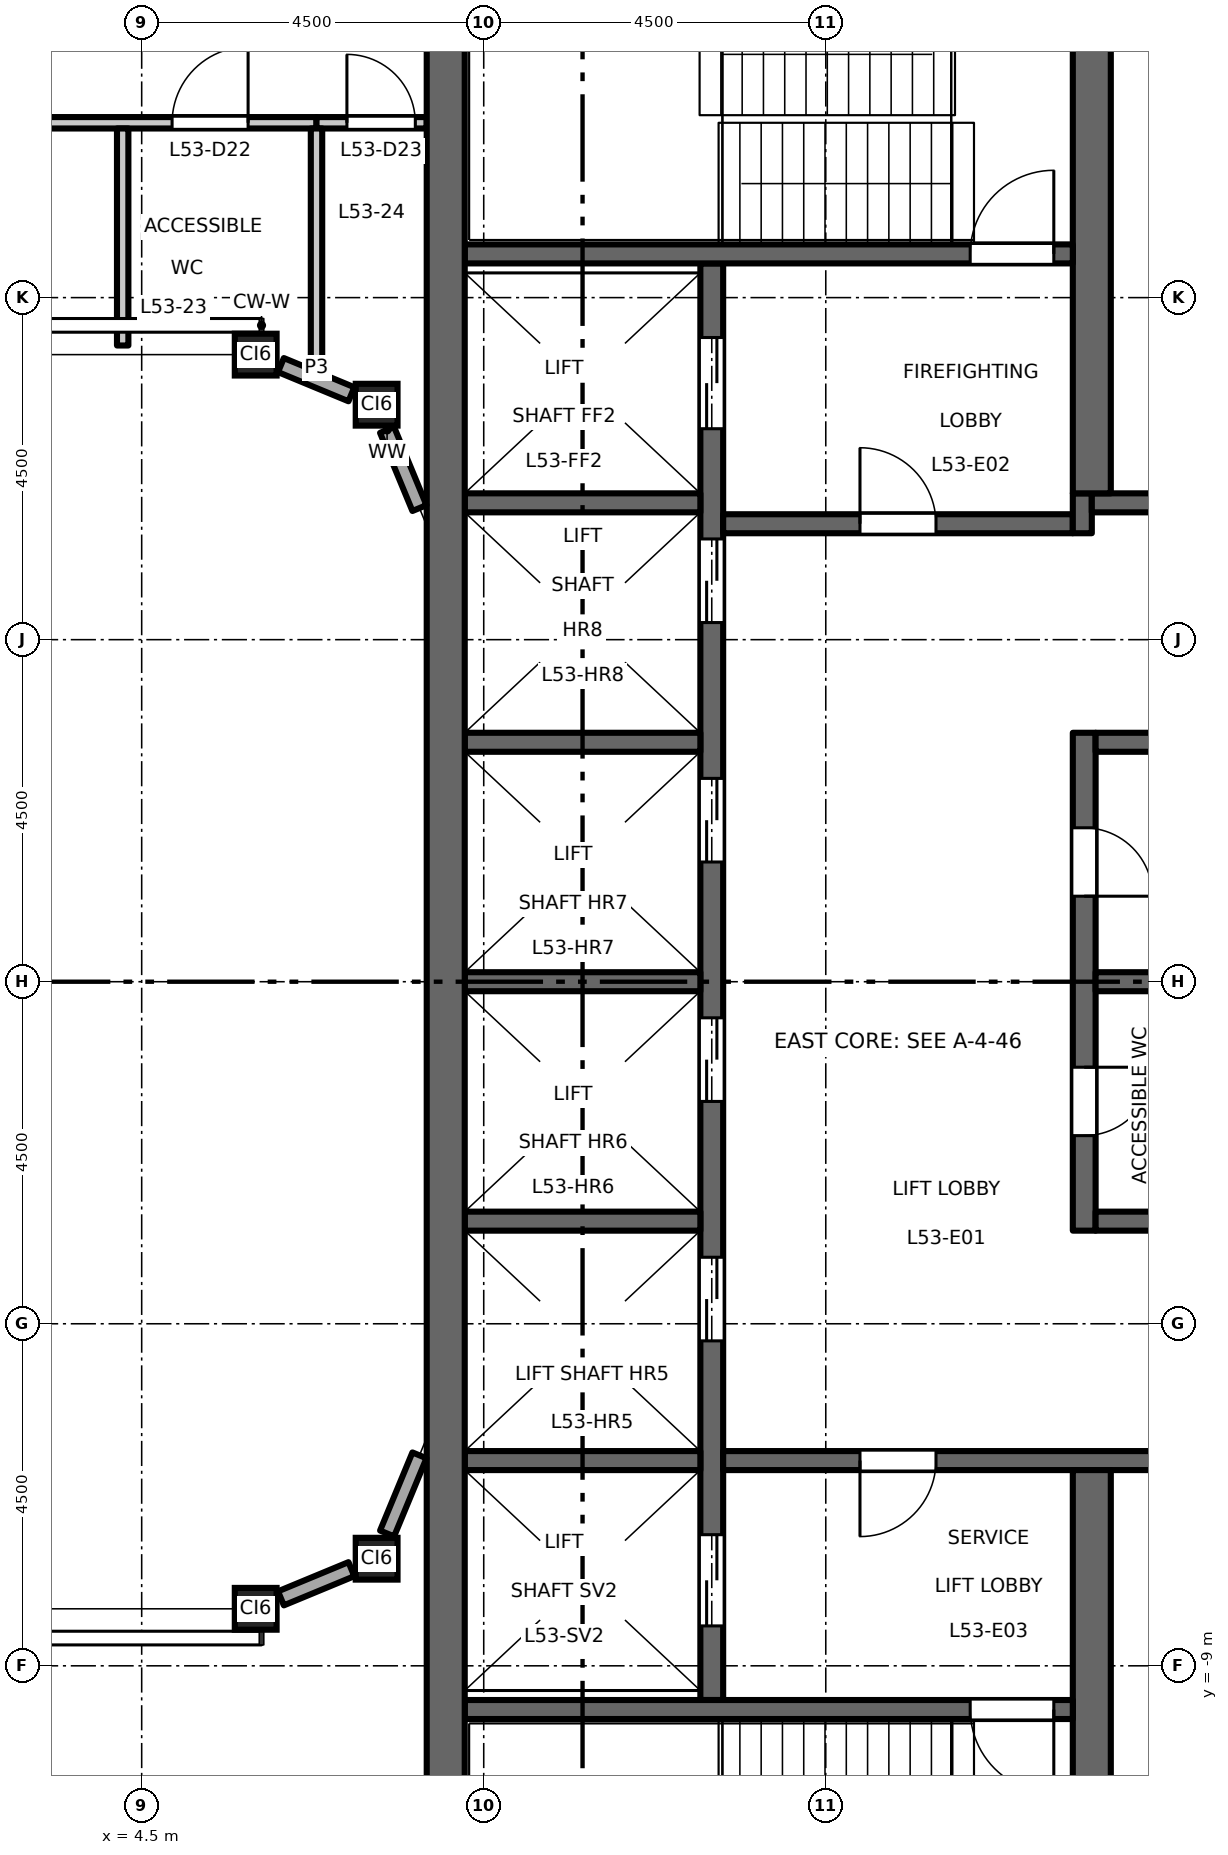
"""IFC4 building model, lengths in metres.
Left out: names, types, materials, properties, quantities, classifications, styles, units other than length and angle.
Written with IfcOpenShell. Run it as: python <this file> out.ifc"""

import sys

from ifc_helpers import new_model, si_unit, direction, frame, frame_2d, origin, origin_2d, place, context, subcontext, project, spatial, rectangle, hollow_rectangle, extrude, element, fill, save


model = new_model("IFC4")
c1 = context("Model", 3, precision=1e-05, world=origin(), true_north=direction((0.0, 1.0)))
c2 = subcontext(c1, "Body", "Model", "MODEL_VIEW")
j1 = project(units=[si_unit("LENGTHUNIT", "METRE"), si_unit("PLANEANGLEUNIT", "RADIAN")], contexts=[c1])
p1 = place(None, origin())
s1 = spatial("IfcSite", under=j1, at=p1, CompositionType="ELEMENT")
p2 = place(p1, origin())
s2 = spatial("IfcBuilding", under=s1, at=p2, CompositionType="ELEMENT")
p3 = place(p2, frame((0.0, 0.0, 246.7)))
s3 = spatial("IfcBuildingStorey", under=s2, at=p3, CompositionType="ELEMENT", Elevation=246.7)
for number, where, z_axis, x_axis in (
    (1, (6.0, -8.25, 0.0), (0.0, 0.0, 1.0), (1.0, 0.0, 0.0)),
    (2, (7.591, -7.591, 0.0), (0.0, 0.0, 1.0), (1.0, 0.0, 0.0)),
    (3, (6.0, 8.25, 0.0), (0.0, 0.0, 1.0), (1.0, 0.0, 0.0)),
    (4, (7.591, 7.591, 0.0), (0.0, 0.0, 1.0), (1.0, 0.0, 0.0)),
):
    element("IfcColumn", number, at=place(p3, frame(where, z_axis=z_axis, x_axis=x_axis)), inside=s3, PredefinedType="COLUMN", context=c2, shape_type="SweptSolid", body=[
        extrude(hollow_rectangle(XDim=0.55, YDim=0.55, WallThickness=0.028, at=origin_2d()), origin(), (0.0, 0.0, 1.0), 4.5),
    ])
p4 = place(p3, frame((12.0, -9.45, 0.0), z_axis=(0.0, 0.0, 1.0), x_axis=(0.0, 1.0, 0.0)))
e5 = element("IfcWall", 5, at=p4, inside=s3, PredefinedType="SHEAR", context=c2, shape_type="SweptSolid", body=[
    extrude(rectangle(XDim=18.9, YDim=0.3, at=frame_2d((9.45, 0.0))), origin(), (0.0, 0.0, 1.0), 4.35),
])
p5 = place(p4, frame((4.725, 0.0, 0.0)))
e6 = element("IfcOpeningElement", 6, at=p5, cuts=e5, PredefinedType="OPENING", context=c2, shape_type="SweptSolid", body=[
    extrude(rectangle(XDim=1.1, YDim=2.1, at=frame_2d((0.55, 1.05))), frame((0.0, 0.16, 0.0), z_axis=(0.0, -1.0, 0.0), x_axis=(1.0, 0.0, 0.0)), (0.0, 0.0, 1.0), 0.32),
])
p6 = place(p4, frame((7.875, 0.0, 0.0)))
e7 = element("IfcOpeningElement", 7, at=p6, cuts=e5, PredefinedType="OPENING", context=c2, shape_type="SweptSolid", body=[
    extrude(rectangle(XDim=1.1, YDim=2.1, at=frame_2d((0.55, 1.05))), frame((0.0, 0.16, 0.0), z_axis=(0.0, -1.0, 0.0), x_axis=(1.0, 0.0, 0.0)), (0.0, 0.0, 1.0), 0.32),
])
p7 = place(p4, frame((11.025, 0.0, 0.0)))
e8 = element("IfcOpeningElement", 8, at=p7, cuts=e5, PredefinedType="OPENING", context=c2, shape_type="SweptSolid", body=[
    extrude(rectangle(XDim=1.1, YDim=2.1, at=frame_2d((0.55, 1.05))), frame((0.0, 0.16, 0.0), z_axis=(0.0, -1.0, 0.0), x_axis=(1.0, 0.0, 0.0)), (0.0, 0.0, 1.0), 0.32),
])
p8 = place(p4, frame((14.175, 0.0, 0.0)))
e9 = element("IfcOpeningElement", 9, at=p8, cuts=e5, PredefinedType="OPENING", context=c2, shape_type="SweptSolid", body=[
    extrude(rectangle(XDim=1.1, YDim=2.1, at=frame_2d((0.55, 1.05))), frame((0.0, 0.16, 0.0), z_axis=(0.0, -1.0, 0.0), x_axis=(1.0, 0.0, 0.0)), (0.0, 0.0, 1.0), 0.32),
])
p9 = place(p4, frame((16.725, 0.0, 0.0)))
e10 = element("IfcOpeningElement", 10, at=p9, cuts=e5, PredefinedType="OPENING", context=c2, shape_type="SweptSolid", body=[
    extrude(rectangle(XDim=1.2, YDim=2.1, at=frame_2d((0.6, 1.05))), frame((0.0, 0.16, 0.0), z_axis=(0.0, -1.0, 0.0), x_axis=(1.0, 0.0, 0.0)), (0.0, 0.0, 1.0), 0.32),
])
p10 = place(p4, frame((0.975, 0.0, 0.0)))
e11 = element("IfcOpeningElement", 11, at=p10, cuts=e5, PredefinedType="OPENING", context=c2, shape_type="SweptSolid", body=[
    extrude(rectangle(XDim=1.2, YDim=2.1, at=frame_2d((0.6, 1.05))), frame((0.0, 0.16, 0.0), z_axis=(0.0, -1.0, 0.0), x_axis=(1.0, 0.0, 0.0)), (0.0, 0.0, 1.0), 0.32),
])
p11 = place(p3, frame((12.15, 6.025, 0.0), z_axis=(0.0, 0.0, 1.0), x_axis=(1.0, 0.0, 0.0)))
e12 = element("IfcWall", 12, at=p11, inside=s3, PredefinedType="SHEAR", context=c2, shape_type="SweptSolid", body=[
    extrude(rectangle(XDim=4.6, YDim=0.25, at=frame_2d((2.3, 0.0))), origin(), (0.0, 0.0, 1.0), 4.35),
])
p12 = place(p11, frame((1.8, 0.0, 0.0)))
e13 = element("IfcOpeningElement", 13, at=p12, cuts=e12, PredefinedType="OPENING", context=c2, shape_type="SweptSolid", body=[
    extrude(rectangle(XDim=1.0, YDim=2.1, at=frame_2d((0.5, 1.05))), frame((0.0, 0.135, 0.0), z_axis=(0.0, -1.0, 0.0), x_axis=(1.0, 0.0, 0.0)), (0.0, 0.0, 1.0), 0.27),
])
p13 = place(p3, frame((16.875, 5.9, 0.0), z_axis=(0.0, 0.0, 1.0), x_axis=(0.0, 1.0, 0.0)))
e14 = element("IfcWall", 14, at=p13, inside=s3, PredefinedType="SHEAR", context=c2, shape_type="SweptSolid", body=[
    extrude(rectangle(XDim=0.525, YDim=0.25, at=frame_2d((0.263, 0.0))), origin(), (0.0, 0.0, 1.0), 4.35),
])
p14 = place(p3, frame((17.0, 6.3, 0.0), z_axis=(0.0, 0.0, 1.0), x_axis=(1.0, 0.0, 0.0)))
e15 = element("IfcWall", 15, at=p14, inside=s3, PredefinedType="SHEAR", context=c2, shape_type="SweptSolid", body=[
    extrude(rectangle(XDim=4.25, YDim=0.25, at=frame_2d((2.125, 0.0))), origin(), (0.0, 0.0, 1.0), 4.35),
])
p15 = place(p3, frame((12.15, -6.3, 0.0), z_axis=(0.0, 0.0, 1.0), x_axis=(1.0, 0.0, 0.0)))
e16 = element("IfcWall", 16, at=p15, inside=s3, PredefinedType="SHEAR", context=c2, shape_type="SweptSolid", body=[
    extrude(rectangle(XDim=9.1, YDim=0.25, at=frame_2d((4.55, 0.0))), origin(), (0.0, 0.0, 1.0), 4.35),
])
p16 = place(p15, frame((1.8, 0.0, 0.0)))
e17 = element("IfcOpeningElement", 17, at=p16, cuts=e16, PredefinedType="OPENING", context=c2, shape_type="SweptSolid", body=[
    extrude(rectangle(XDim=1.0, YDim=2.1, at=frame_2d((0.5, 1.05))), frame((0.0, 0.135, 0.0), z_axis=(0.0, -1.0, 0.0), x_axis=(1.0, 0.0, 0.0)), (0.0, 0.0, 1.0), 0.27),
])
p17 = place(p3, frame((16.9, -3.275, 0.0), z_axis=(0.0, 0.0, 1.0), x_axis=(0.0, 1.0, 0.0)))
e18 = element("IfcWall", 18, at=p17, inside=s3, PredefinedType="SHEAR", context=c2, shape_type="SweptSolid", body=[
    extrude(rectangle(XDim=6.55, YDim=0.3, at=frame_2d((3.275, 0.0))), origin(), (0.0, 0.0, 1.0), 4.35),
])
p18 = place(p17, frame((1.25, 0.0, 0.0)))
e19 = element("IfcOpeningElement", 19, at=p18, cuts=e18, PredefinedType="OPENING", context=c2, shape_type="SweptSolid", body=[
    extrude(rectangle(XDim=0.9, YDim=2.1, at=frame_2d((0.45, 1.05))), frame((0.0, 0.16, 0.0), z_axis=(0.0, -1.0, 0.0), x_axis=(1.0, 0.0, 0.0)), (0.0, 0.0, 1.0), 0.32),
])
p19 = place(p17, frame((4.4, 0.0, 0.0)))
e20 = element("IfcOpeningElement", 20, at=p19, cuts=e18, PredefinedType="OPENING", context=c2, shape_type="SweptSolid", body=[
    extrude(rectangle(XDim=0.9, YDim=2.1, at=frame_2d((0.45, 1.05))), frame((0.0, 0.16, 0.0), z_axis=(0.0, -1.0, 0.0), x_axis=(1.0, 0.0, 0.0)), (0.0, 0.0, 1.0), 0.32),
])
for number, where, z_axis, x_axis in (
    (21, (17.05, 0.0, 0.0), (0.0, 0.0, 1.0), (1.0, 0.0, 0.0)),
    (22, (17.05, 3.15, 0.0), (0.0, 0.0, 1.0), (1.0, 0.0, 0.0)),
    (23, (17.05, -3.15, 0.0), (0.0, 0.0, 1.0), (1.0, 0.0, 0.0)),
):
    element("IfcWall", number, at=place(p3, frame(where, z_axis=z_axis, x_axis=x_axis)), inside=s3, PredefinedType="SHEAR", context=c2, shape_type="SweptSolid", body=[
        extrude(rectangle(XDim=4.2, YDim=0.25, at=frame_2d((2.1, 0.0))), origin(), (0.0, 0.0, 1.0), 4.35),
    ])
for number, where, z_axis, x_axis in (
    (24, (17.0, 6.425, 0.0), (0.0, 0.0, 1.0), (0.0, 1.0, 0.0)),
    (25, (17.0, -13.0, 0.0), (0.0, 0.0, 1.0), (0.0, 1.0, 0.0)),
):
    element("IfcWall", number, at=place(p3, frame(where, z_axis=z_axis, x_axis=x_axis)), inside=s3, PredefinedType="SHEAR", context=c2, shape_type="SweptSolid", body=[
        extrude(rectangle(XDim=6.575, YDim=0.5, at=frame_2d((3.288, 0.0))), origin(), (0.0, 0.0, 1.0), 4.35),
    ])
for number, where, z_axis, x_axis in (
    (26, (8.75, 0.0, 0.0), (0.0, 0.0, 1.0), (1.0, 0.0, 0.0)),
    (27, (8.75, 3.15, 0.0), (0.0, 0.0, 1.0), (1.0, 0.0, 0.0)),
    (28, (8.75, 6.3, 0.0), (0.0, 0.0, 1.0), (1.0, 0.0, 0.0)),
    (29, (8.75, -3.15, 0.0), (0.0, 0.0, 1.0), (1.0, 0.0, 0.0)),
    (30, (8.75, -6.3, 0.0), (0.0, 0.0, 1.0), (1.0, 0.0, 0.0)),
):
    element("IfcWall", number, at=place(p3, frame(where, z_axis=z_axis, x_axis=x_axis)), inside=s3, PredefinedType="SHEAR", context=c2, shape_type="SweptSolid", body=[
        extrude(rectangle(XDim=3.1, YDim=0.25, at=frame_2d((1.55, 0.0))), origin(), (0.0, 0.0, 1.0), 4.35),
    ])
p20 = place(p3, frame((8.75, 9.575, 0.0), z_axis=(0.0, 0.0, 1.0), x_axis=(1.0, 0.0, 0.0)))
e31 = element("IfcWall", 31, at=p20, inside=s3, PredefinedType="SHEAR", context=c2, shape_type="SweptSolid", body=[
    extrude(rectangle(XDim=8.0, YDim=0.25, at=frame_2d((4.0, 0.0))), origin(), (0.0, 0.0, 1.0), 4.35),
])
p21 = place(p20, frame((6.65, 0.0, 0.0)))
e32 = element("IfcOpeningElement", 32, at=p21, cuts=e31, PredefinedType="OPENING", context=c2, shape_type="SweptSolid", body=[
    extrude(rectangle(XDim=1.1, YDim=2.1, at=frame_2d((0.55, 1.05))), frame((0.0, 0.135, 0.0), z_axis=(0.0, -1.0, 0.0), x_axis=(1.0, 0.0, 0.0)), (0.0, 0.0, 1.0), 0.27),
])
p22 = place(p3, frame((8.75, -9.575, 0.0), z_axis=(0.0, 0.0, 1.0), x_axis=(1.0, 0.0, 0.0)))
e33 = element("IfcWall", 33, at=p22, inside=s3, PredefinedType="SHEAR", context=c2, shape_type="SweptSolid", body=[
    extrude(rectangle(XDim=8.0, YDim=0.25, at=frame_2d((4.0, 0.0))), origin(), (0.0, 0.0, 1.0), 4.35),
])
p23 = place(p22, frame((6.65, 0.0, 0.0)))
e34 = element("IfcOpeningElement", 34, at=p23, cuts=e33, PredefinedType="OPENING", context=c2, shape_type="SweptSolid", body=[
    extrude(rectangle(XDim=1.1, YDim=2.1, at=frame_2d((0.55, 1.05))), frame((0.0, 0.135, 0.0), z_axis=(0.0, -1.0, 0.0), x_axis=(1.0, 0.0, 0.0)), (0.0, 0.0, 1.0), 0.27),
])
p24 = place(p3, frame((8.5, -13.0, 0.0), z_axis=(0.0, 0.0, 1.0), x_axis=(0.0, 1.0, 0.0)))
e35 = element("IfcWall", 35, at=p24, inside=s3, PredefinedType="SHEAR", context=c2, shape_type="SweptSolid", body=[
    extrude(rectangle(XDim=26.0, YDim=0.5, at=frame_2d((13.0, 0.0))), origin(), (0.0, 0.0, 1.0), 4.35),
])
p25 = place(p3, frame((6.332, -8.113, 0.0), z_axis=(0.0, 0.0, 1.0), x_axis=(0.923859650767, 0.382731427616, 0.0)))
e36 = element("IfcWall", 36, at=p25, inside=s3, PredefinedType="STANDARD", context=c2, shape_type="SweptSolid", body=[
    extrude(rectangle(XDim=1.003, YDim=0.2, at=frame_2d((0.502, 0.0))), origin(), (0.0, 0.0, 1.0), 3.918),
])
for number, where, z_axis, x_axis in (
    (37, (7.729, -7.259, 0.0), (0.0, 0.0, 1.0), (0.383, 0.924, 0.0)),
    (38, (8.154, 6.231, 0.0), (0.0, 0.0, 1.0), (-0.383, 0.924, 0.0)),
):
    element("IfcWall", number, at=place(p3, frame(where, z_axis=z_axis, x_axis=x_axis)), inside=s3, PredefinedType="STANDARD", context=c2, shape_type="SweptSolid", body=[
        extrude(rectangle(XDim=1.113, YDim=0.2, at=frame_2d((0.556, 0.0))), origin(), (0.0, 0.0, 1.0), 3.918),
    ])
p26 = place(p3, frame((7.259, 7.729, 0.0), z_axis=(0.0, 0.0, 1.0), x_axis=(-0.923859650767, 0.382731427616, 0.0)))
e39 = element("IfcWall", 39, at=p26, inside=s3, PredefinedType="STANDARD", context=c2, shape_type="SweptSolid", body=[
    extrude(rectangle(XDim=1.003, YDim=0.2, at=frame_2d((0.502, 0.0))), origin(), (0.0, 0.0, 1.0), 3.918),
])
p27 = place(p3, frame((-8.25, 11.3, 0.0), z_axis=(0.0, 0.0, 1.0), x_axis=(1.0, 0.0, 0.0)))
e40 = element("IfcWall", 40, at=p27, inside=s3, PredefinedType="PARTITIONING", context=c2, shape_type="SweptSolid", body=[
    extrude(rectangle(XDim=15.05, YDim=0.15, at=frame_2d((7.525, 0.0))), origin(), (0.0, 0.0, 1.0), 4.35),
])
p28 = place(p27, frame((4.65, 0.0, 0.0)))
e41 = element("IfcOpeningElement", 41, at=p28, cuts=e40, PredefinedType="OPENING", context=c2, shape_type="SweptSolid", body=[
    extrude(rectangle(XDim=1.0, YDim=2.1, at=frame_2d((0.5, 1.05))), frame((0.0, 0.085, 0.0), z_axis=(0.0, -1.0, 0.0), x_axis=(1.0, 0.0, 0.0)), (0.0, 0.0, 1.0), 0.17),
])
p29 = place(p27, frame((6.9, 0.0, 0.0)))
e42 = element("IfcOpeningElement", 42, at=p29, cuts=e40, PredefinedType="OPENING", context=c2, shape_type="SweptSolid", body=[
    extrude(rectangle(XDim=1.0, YDim=2.1, at=frame_2d((0.5, 1.05))), frame((0.0, 0.085, 0.0), z_axis=(0.0, -1.0, 0.0), x_axis=(1.0, 0.0, 0.0)), (0.0, 0.0, 1.0), 0.17),
])
p30 = place(p27, frame((13.15, 0.0, 0.0)))
e43 = element("IfcOpeningElement", 43, at=p30, cuts=e40, PredefinedType="OPENING", context=c2, shape_type="SweptSolid", body=[
    extrude(rectangle(XDim=1.0, YDim=2.1, at=frame_2d((0.5, 1.05))), frame((0.0, 0.085, 0.0), z_axis=(0.0, -1.0, 0.0), x_axis=(1.0, 0.0, 0.0)), (0.0, 0.0, 1.0), 0.17),
])
p31 = place(p3, frame((6.8, 11.3, 0.0), z_axis=(0.0, 0.0, 1.0), x_axis=(1.0, 0.0, 0.0)))
e44 = element("IfcWall", 44, at=p31, inside=s3, PredefinedType="PARTITIONING", context=c2, shape_type="SweptSolid", body=[
    extrude(rectangle(XDim=1.45, YDim=0.15, at=frame_2d((0.725, 0.0))), origin(), (0.0, 0.0, 1.0), 4.35),
])
p32 = place(p31, frame((0.4, 0.0, 0.0)))
e45 = element("IfcOpeningElement", 45, at=p32, cuts=e44, PredefinedType="OPENING", context=c2, shape_type="SweptSolid", body=[
    extrude(rectangle(XDim=0.9, YDim=2.1, at=frame_2d((0.45, 1.05))), frame((0.0, 0.085, 0.0), z_axis=(0.0, -1.0, 0.0), x_axis=(1.0, 0.0, 0.0)), (0.0, 0.0, 1.0), 0.17),
])
p33 = place(p3, frame((4.25, 8.37, 0.0), z_axis=(0.0, 0.0, 1.0), x_axis=(0.0, 1.0, 0.0)))
e46 = element("IfcWall", 46, at=p33, inside=s3, PredefinedType="PARTITIONING", context=c2, shape_type="SweptSolid", body=[
    extrude(rectangle(XDim=2.855, YDim=0.15, at=frame_2d((1.427, 0.0))), origin(), (0.0, 0.0, 1.0), 4.35),
])
p34 = place(p3, frame((6.8, 8.069, 0.0), z_axis=(0.0, 0.0, 1.0), x_axis=(0.0, 1.0, 0.0)))
e47 = element("IfcWall", 47, at=p34, inside=s3, PredefinedType="PARTITIONING", context=c2, shape_type="SweptSolid", body=[
    extrude(rectangle(XDim=3.156, YDim=0.15, at=frame_2d((1.578, 0.0))), origin(), (0.0, 0.0, 1.0), 4.35),
])
p35 = place(p12, origin())
e48 = element("IfcDoor", 48, at=p35, inside=s3, OperationType="SINGLE_SWING_RIGHT", PredefinedType="DOOR", context=c2, shape_type="SweptSolid", body=[
    extrude(rectangle(XDim=1.0, YDim=2.1, at=frame_2d((0.5, 1.05))), frame((0.0, 0.025, 0.0), z_axis=(0.0, -1.0, 0.0), x_axis=(1.0, 0.0, 0.0)), (0.0, 0.0, 1.0), 0.05),
])
fill(e13, e48)
p36 = place(p16, origin())
e49 = element("IfcDoor", 49, at=p36, inside=s3, OperationType="SINGLE_SWING_LEFT", PredefinedType="DOOR", context=c2, shape_type="SweptSolid", body=[
    extrude(rectangle(XDim=1.0, YDim=2.1, at=frame_2d((0.5, 1.05))), frame((0.0, 0.025, 0.0), z_axis=(0.0, -1.0, 0.0), x_axis=(1.0, 0.0, 0.0)), (0.0, 0.0, 1.0), 0.05),
])
fill(e17, e49)
p37 = place(p21, origin())
e50 = element("IfcDoor", 50, at=p37, inside=s3, OperationType="SINGLE_SWING_LEFT", PredefinedType="DOOR", context=c2, shape_type="SweptSolid", body=[
    extrude(rectangle(XDim=1.1, YDim=2.1, at=frame_2d((0.55, 1.05))), frame((0.0, 0.025, 0.0), z_axis=(0.0, -1.0, 0.0), x_axis=(1.0, 0.0, 0.0)), (0.0, 0.0, 1.0), 0.05),
])
fill(e32, e50)
p38 = place(p23, origin())
e51 = element("IfcDoor", 51, at=p38, inside=s3, OperationType="SINGLE_SWING_RIGHT", PredefinedType="DOOR", context=c2, shape_type="SweptSolid", body=[
    extrude(rectangle(XDim=1.1, YDim=2.1, at=frame_2d((0.55, 1.05))), frame((0.0, 0.025, 0.0), z_axis=(0.0, -1.0, 0.0), x_axis=(1.0, 0.0, 0.0)), (0.0, 0.0, 1.0), 0.05),
])
fill(e34, e51)
p39 = place(p5, origin())
e52 = element("IfcDoor", 52, at=p39, inside=s3, OperationType="DOUBLE_DOOR_SLIDING", PredefinedType="DOOR", context=c2, shape_type="SweptSolid", body=[
    extrude(rectangle(XDim=1.1, YDim=2.1, at=frame_2d((0.55, 1.05))), frame((0.0, 0.025, 0.0), z_axis=(0.0, -1.0, 0.0), x_axis=(1.0, 0.0, 0.0)), (0.0, 0.0, 1.0), 0.05),
])
fill(e6, e52)
p40 = place(p6, origin())
e53 = element("IfcDoor", 53, at=p40, inside=s3, OperationType="DOUBLE_DOOR_SLIDING", PredefinedType="DOOR", context=c2, shape_type="SweptSolid", body=[
    extrude(rectangle(XDim=1.1, YDim=2.1, at=frame_2d((0.55, 1.05))), frame((0.0, 0.025, 0.0), z_axis=(0.0, -1.0, 0.0), x_axis=(1.0, 0.0, 0.0)), (0.0, 0.0, 1.0), 0.05),
])
fill(e7, e53)
p41 = place(p7, origin())
e54 = element("IfcDoor", 54, at=p41, inside=s3, OperationType="DOUBLE_DOOR_SLIDING", PredefinedType="DOOR", context=c2, shape_type="SweptSolid", body=[
    extrude(rectangle(XDim=1.1, YDim=2.1, at=frame_2d((0.55, 1.05))), frame((0.0, 0.025, 0.0), z_axis=(0.0, -1.0, 0.0), x_axis=(1.0, 0.0, 0.0)), (0.0, 0.0, 1.0), 0.05),
])
fill(e8, e54)
p42 = place(p8, origin())
e55 = element("IfcDoor", 55, at=p42, inside=s3, OperationType="DOUBLE_DOOR_SLIDING", PredefinedType="DOOR", context=c2, shape_type="SweptSolid", body=[
    extrude(rectangle(XDim=1.1, YDim=2.1, at=frame_2d((0.55, 1.05))), frame((0.0, 0.025, 0.0), z_axis=(0.0, -1.0, 0.0), x_axis=(1.0, 0.0, 0.0)), (0.0, 0.0, 1.0), 0.05),
])
fill(e9, e55)
p43 = place(p9, origin())
e56 = element("IfcDoor", 56, at=p43, inside=s3, OperationType="DOUBLE_DOOR_SLIDING", PredefinedType="DOOR", context=c2, shape_type="SweptSolid", body=[
    extrude(rectangle(XDim=1.2, YDim=2.1, at=frame_2d((0.6, 1.05))), frame((0.0, 0.025, 0.0), z_axis=(0.0, -1.0, 0.0), x_axis=(1.0, 0.0, 0.0)), (0.0, 0.0, 1.0), 0.05),
])
fill(e10, e56)
p44 = place(p10, origin())
e57 = element("IfcDoor", 57, at=p44, inside=s3, OperationType="DOUBLE_DOOR_SLIDING", PredefinedType="DOOR", context=c2, shape_type="SweptSolid", body=[
    extrude(rectangle(XDim=1.2, YDim=2.1, at=frame_2d((0.6, 1.05))), frame((0.0, 0.025, 0.0), z_axis=(0.0, -1.0, 0.0), x_axis=(1.0, 0.0, 0.0)), (0.0, 0.0, 1.0), 0.05),
])
fill(e11, e57)
p45 = place(p18, origin())
e58 = element("IfcDoor", 58, at=p45, inside=s3, OperationType="SINGLE_SWING_RIGHT", PredefinedType="DOOR", context=c2, shape_type="SweptSolid", body=[
    extrude(rectangle(XDim=0.9, YDim=2.1, at=frame_2d((0.45, 1.05))), frame((0.0, 0.025, 0.0), z_axis=(0.0, -1.0, 0.0), x_axis=(1.0, 0.0, 0.0)), (0.0, 0.0, 1.0), 0.05),
])
fill(e19, e58)
p46 = place(p19, origin())
e59 = element("IfcDoor", 59, at=p46, inside=s3, OperationType="SINGLE_SWING_LEFT", PredefinedType="DOOR", context=c2, shape_type="SweptSolid", body=[
    extrude(rectangle(XDim=0.9, YDim=2.1, at=frame_2d((0.45, 1.05))), frame((0.0, 0.025, 0.0), z_axis=(0.0, -1.0, 0.0), x_axis=(1.0, 0.0, 0.0)), (0.0, 0.0, 1.0), 0.05),
])
fill(e20, e59)
p47 = place(p30, origin())
e60 = element("IfcDoor", 60, at=p47, inside=s3, OperationType="SINGLE_SWING_RIGHT", PredefinedType="DOOR", context=c2, shape_type="SweptSolid", body=[
    extrude(rectangle(XDim=1.0, YDim=2.1, at=frame_2d((0.5, 1.05))), frame((0.0, 0.025, 0.0), z_axis=(0.0, -1.0, 0.0), x_axis=(1.0, 0.0, 0.0)), (0.0, 0.0, 1.0), 0.05),
])
fill(e43, e60)
p48 = place(p32, origin())
e61 = element("IfcDoor", 61, at=p48, inside=s3, OperationType="SINGLE_SWING_LEFT", PredefinedType="DOOR", context=c2, shape_type="SweptSolid", body=[
    extrude(rectangle(XDim=0.9, YDim=2.1, at=frame_2d((0.45, 1.05))), frame((0.0, 0.025, 0.0), z_axis=(0.0, -1.0, 0.0), x_axis=(1.0, 0.0, 0.0)), (0.0, 0.0, 1.0), 0.05),
])
fill(e45, e61)
save(model, sys.argv[1])
